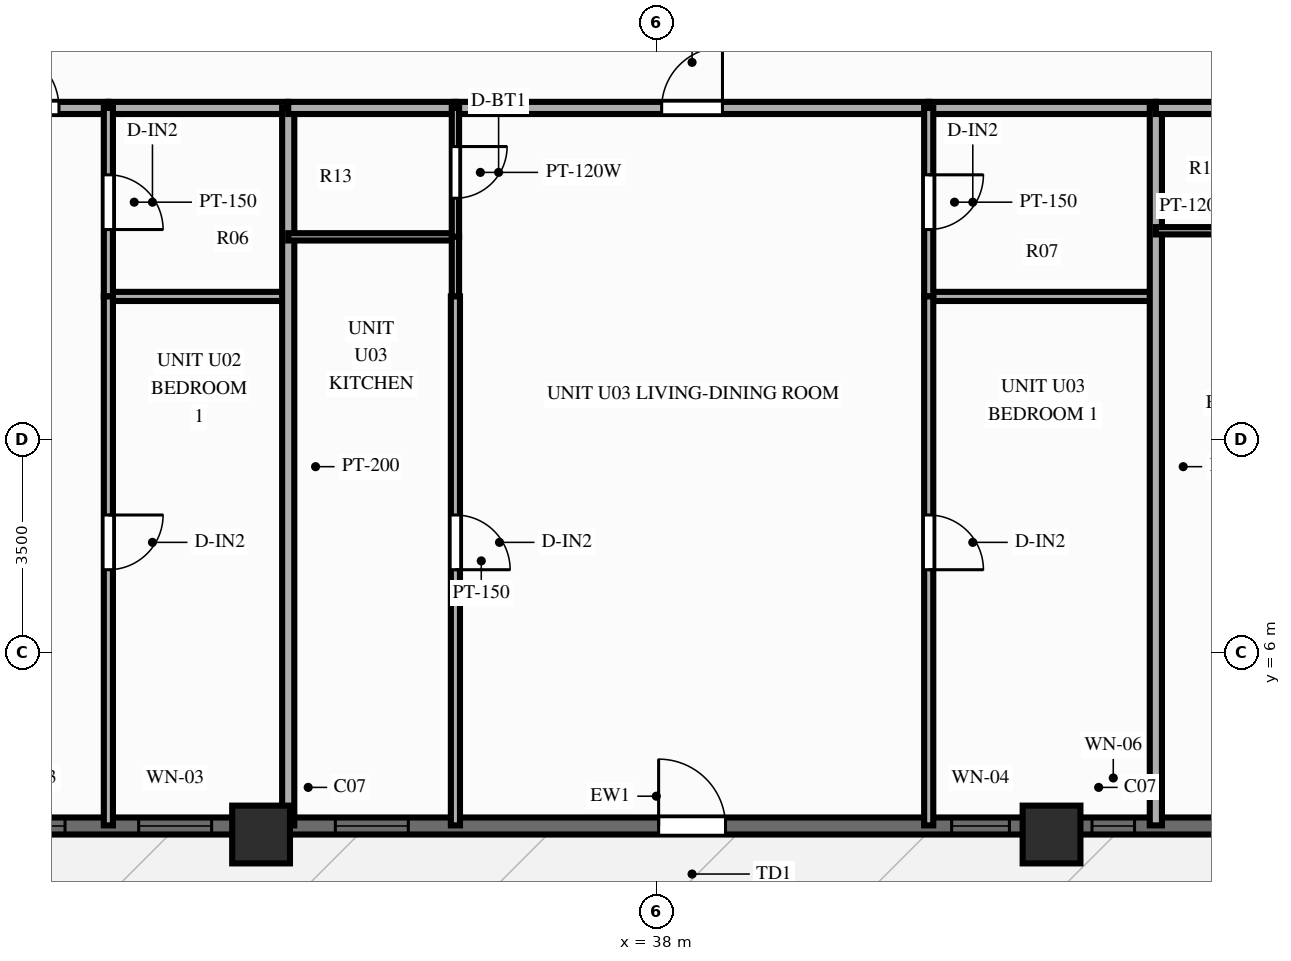
"""IFC4 building model, lengths in metres.
Left out: names, types, materials, properties, quantities, classifications, styles, units other than length and angle.
Written with IfcOpenShell. Run it as: python <this file> out.ifc"""

import sys

from ifc_helpers import new_model, si_unit, direction, frame, frame_2d, origin, origin_2d, place, context, subcontext, project, spatial, rectangle, extrude, source, transform, mapped, element, fill, save


model = new_model("IFC4")
c1 = context("Model", 3, precision=1e-05, world=origin(), true_north=direction((0.0, 1.0)))
c2 = subcontext(c1, "Body", "Model", "MODEL_VIEW")
j1 = project(units=[si_unit("LENGTHUNIT", "METRE"), si_unit("PLANEANGLEUNIT", "RADIAN")], contexts=[c1])
p1 = place(None, origin())
s1 = spatial("IfcSite", under=j1, at=p1, CompositionType="ELEMENT")
p2 = place(p1, origin())
s2 = spatial("IfcBuilding", under=s1, at=p2, CompositionType="ELEMENT")
p3 = place(p2, frame((0.0, 0.0, 83.85)))
s3 = spatial("IfcBuildingStorey", under=s2, at=p3, CompositionType="ELEMENT", Elevation=83.85)
m1 = source(origin(), c2, "Body", "SweptSolid", [
    extrude(rectangle(XDim=0.95, YDim=0.95, at=origin_2d()), origin(), (0.0, 0.0, 1.0), 3.0),
])
for number, where, z_axis, x_axis in (
    (1, (31.5, 3.0, 0.0), (0.0, 0.0, 1.0), (1.0, 0.0, 0.0)),
    (2, (44.5, 3.0, 0.0), (0.0, 0.0, 1.0), (1.0, 0.0, 0.0)),
):
    element("IfcColumn", number, at=place(p3, frame(where, z_axis=z_axis, x_axis=x_axis)), inside=s3, PredefinedType="COLUMN", context=c2, shape_type="MappedRepresentation", body=[
        mapped(m1, transform((0.0, 0.0, 0.0), scale=1.0)),
    ])
p4 = place(p3, frame((16.2, 3.14, 0.0), z_axis=(0.0, 0.0, 1.0), x_axis=(1.0, 0.0, 0.0)))
e3 = element("IfcWall", 3, at=p4, inside=s3, PredefinedType="SOLIDWALL", context=c2, shape_type="SweptSolid", body=[
    extrude(rectangle(XDim=43.6, YDim=0.28, at=frame_2d((21.8, 0.0))), origin(), (0.0, 0.0, 1.0), 2.28),
])
p5 = place(p4, frame((0.748, 0.0, 0.25)))
e4 = element("IfcOpeningElement", 4, at=p5, cuts=e3, PredefinedType="OPENING", context=c2, shape_type="SweptSolid", body=[
    extrude(rectangle(XDim=1.2, YDim=1.5, at=frame_2d((0.6, 0.75))), frame((0.0, 0.152, 0.0), z_axis=(0.0, -1.0, 0.0), x_axis=(1.0, 0.0, 0.0)), (0.0, 0.0, 1.0), 0.304),
])
p6 = place(p4, frame((3.093, 0.0, 0.25)))
e5 = element("IfcOpeningElement", 5, at=p6, cuts=e3, PredefinedType="OPENING", context=c2, shape_type="SweptSolid", body=[
    extrude(rectangle(XDim=1.2, YDim=1.5, at=frame_2d((0.6, 0.75))), frame((0.0, 0.152, 0.0), z_axis=(0.0, -1.0, 0.0), x_axis=(1.0, 0.0, 0.0)), (0.0, 0.0, 1.0), 0.304),
])
p7 = place(p4, frame((5.885, 0.0, 0.25)))
e6 = element("IfcOpeningElement", 6, at=p7, cuts=e3, PredefinedType="OPENING", context=c2, shape_type="SweptSolid", body=[
    extrude(rectangle(XDim=1.2, YDim=1.5, at=frame_2d((0.6, 0.75))), frame((0.0, 0.152, 0.0), z_axis=(0.0, -1.0, 0.0), x_axis=(1.0, 0.0, 0.0)), (0.0, 0.0, 1.0), 0.304),
])
p8 = place(p4, frame((8.463, 0.0, 0.25)))
e7 = element("IfcOpeningElement", 7, at=p8, cuts=e3, PredefinedType="OPENING", context=c2, shape_type="SweptSolid", body=[
    extrude(rectangle(XDim=1.2, YDim=1.5, at=frame_2d((0.6, 0.75))), frame((0.0, 0.152, 0.0), z_axis=(0.0, -1.0, 0.0), x_axis=(1.0, 0.0, 0.0)), (0.0, 0.0, 1.0), 0.304),
])
p9 = place(p4, frame((10.876, 0.0, 0.25)))
e8 = element("IfcOpeningElement", 8, at=p9, cuts=e3, PredefinedType="OPENING", context=c2, shape_type="SweptSolid", body=[
    extrude(rectangle(XDim=1.2, YDim=1.5, at=frame_2d((0.6, 0.75))), frame((0.0, 0.152, 0.0), z_axis=(0.0, -1.0, 0.0), x_axis=(1.0, 0.0, 0.0)), (0.0, 0.0, 1.0), 0.304),
])
p10 = place(p4, frame((13.287, 0.0, 0.25)))
e9 = element("IfcOpeningElement", 9, at=p10, cuts=e3, PredefinedType="OPENING", context=c2, shape_type="SweptSolid", body=[
    extrude(rectangle(XDim=1.2, YDim=1.5, at=frame_2d((0.6, 0.75))), frame((0.0, 0.152, 0.0), z_axis=(0.0, -1.0, 0.0), x_axis=(1.0, 0.0, 0.0)), (0.0, 0.0, 1.0), 0.304),
])
p11 = place(p4, frame((16.521, 0.0, 0.25)))
e10 = element("IfcOpeningElement", 10, at=p11, cuts=e3, PredefinedType="OPENING", context=c2, shape_type="SweptSolid", body=[
    extrude(rectangle(XDim=1.2, YDim=1.5, at=frame_2d((0.6, 0.75))), frame((0.0, 0.152, 0.0), z_axis=(0.0, -1.0, 0.0), x_axis=(1.0, 0.0, 0.0)), (0.0, 0.0, 1.0), 0.304),
])
p12 = place(p4, frame((22.938, 0.0, 0.0), z_axis=(0.0, 0.0, 1.0), x_axis=(-1.0, 0.0, 0.0)))
e11 = element("IfcOpeningElement", 11, at=p12, cuts=e3, PredefinedType="OPENING", context=c2, shape_type="SweptSolid", body=[
    extrude(rectangle(XDim=1.1, YDim=2.15, at=frame_2d((0.55, 1.075))), frame((0.0, 0.152, 0.0), z_axis=(0.0, -1.0, 0.0), x_axis=(1.0, 0.0, 0.0)), (0.0, 0.0, 1.0), 0.304),
])
p13 = place(p4, frame((26.657, 0.0, 0.25)))
e12 = element("IfcOpeningElement", 12, at=p13, cuts=e3, PredefinedType="OPENING", context=c2, shape_type="SweptSolid", body=[
    extrude(rectangle(XDim=0.95, YDim=1.5, at=frame_2d((0.475, 0.75))), frame((0.0, 0.152, 0.0), z_axis=(0.0, -1.0, 0.0), x_axis=(1.0, 0.0, 0.0)), (0.0, 0.0, 1.0), 0.304),
])
p14 = place(p4, frame((28.965, 0.0, 0.25)))
e13 = element("IfcOpeningElement", 13, at=p14, cuts=e3, PredefinedType="OPENING", context=c2, shape_type="SweptSolid", body=[
    extrude(rectangle(XDim=0.7, YDim=1.5, at=frame_2d((0.35, 0.75))), frame((0.0, 0.152, 0.0), z_axis=(0.0, -1.0, 0.0), x_axis=(1.0, 0.0, 0.0)), (0.0, 0.0, 1.0), 0.304),
])
p15 = place(p4, frame((31.158, 0.0, 0.25)))
e14 = element("IfcOpeningElement", 14, at=p15, cuts=e3, PredefinedType="OPENING", context=c2, shape_type="SweptSolid", body=[
    extrude(rectangle(XDim=1.2, YDim=1.5, at=frame_2d((0.6, 0.75))), frame((0.0, 0.152, 0.0), z_axis=(0.0, -1.0, 0.0), x_axis=(1.0, 0.0, 0.0)), (0.0, 0.0, 1.0), 0.304),
])
p16 = place(p4, frame((35.992, 0.0, 0.25)))
e15 = element("IfcOpeningElement", 15, at=p16, cuts=e3, PredefinedType="OPENING", context=c2, shape_type="SweptSolid", body=[
    extrude(rectangle(XDim=1.2, YDim=1.5, at=frame_2d((0.6, 0.75))), frame((0.0, 0.152, 0.0), z_axis=(0.0, -1.0, 0.0), x_axis=(1.0, 0.0, 0.0)), (0.0, 0.0, 1.0), 0.304),
])
p17 = place(p4, frame((40.885, 0.0, 0.25)))
e16 = element("IfcOpeningElement", 16, at=p17, cuts=e3, PredefinedType="OPENING", context=c2, shape_type="SweptSolid", body=[
    extrude(rectangle(XDim=1.2, YDim=1.5, at=frame_2d((0.6, 0.75))), frame((0.0, 0.152, 0.0), z_axis=(0.0, -1.0, 0.0), x_axis=(1.0, 0.0, 0.0)), (0.0, 0.0, 1.0), 0.304),
])
p18 = place(p3, frame((26.363, 14.95, 0.0), z_axis=(0.0, 0.0, 1.0), x_axis=(1.0, 0.0, 0.0)))
e17 = element("IfcWall", 17, at=p18, inside=s3, PredefinedType="PARTITIONING", context=c2, shape_type="SweptSolid", body=[
    extrude(rectangle(XDim=2.625, YDim=0.2, at=frame_2d((1.313, 0.0))), origin(), (0.0, 0.0, 1.0), 2.79),
])
p19 = place(p18, frame((0.813, 0.0, 0.0)))
e18 = element("IfcOpeningElement", 18, at=p19, cuts=e17, PredefinedType="OPENING", context=c2, shape_type="SweptSolid", body=[
    extrude(rectangle(XDim=1.0, YDim=2.15, at=frame_2d((0.5, 1.075))), frame((0.0, 0.112, 0.0), z_axis=(0.0, -1.0, 0.0), x_axis=(1.0, 0.0, 0.0)), (0.0, 0.0, 1.0), 0.224),
])
p20 = place(p3, frame((28.989, 14.95, 0.0), z_axis=(0.0, 0.0, 1.0), x_axis=(1.0, 0.0, 0.0)))
e19 = element("IfcWall", 19, at=p20, inside=s3, PredefinedType="PARTITIONING", context=c2, shape_type="SweptSolid", body=[
    extrude(rectangle(XDim=2.958, YDim=0.2, at=frame_2d((1.479, 0.0))), origin(), (0.0, 0.0, 1.0), 2.79),
])
p21 = place(p3, frame((28.989, 11.85, 0.0), z_axis=(0.0, 0.0, 1.0), x_axis=(1.0, 0.0, 0.0)))
e20 = element("IfcWall", 20, at=p21, inside=s3, PredefinedType="PARTITIONING", context=c2, shape_type="SweptSolid", body=[
    extrude(rectangle(XDim=2.958, YDim=0.15, at=frame_2d((1.479, 0.0))), origin(), (0.0, 0.0, 1.0), 2.79),
])
p22 = place(p3, frame((28.989, 14.95, 0.0), z_axis=(0.0, 0.0, 1.0), x_axis=(0.0, -1.0, 0.0)))
e21 = element("IfcWall", 21, at=p22, inside=s3, PredefinedType="PARTITIONING", context=c2, shape_type="SweptSolid", body=[
    extrude(rectangle(XDim=3.1, YDim=0.15, at=frame_2d((1.55, 0.0))), origin(), (0.0, 0.0, 1.0), 2.79),
])
p23 = place(p22, frame((1.1, 0.0, 0.0)))
e22 = element("IfcOpeningElement", 22, at=p23, cuts=e21, PredefinedType="OPENING", context=c2, shape_type="SweptSolid", body=[
    extrude(rectangle(XDim=0.9, YDim=2.1, at=frame_2d((0.45, 1.05))), frame((0.0, 0.087, 0.0), z_axis=(0.0, -1.0, 0.0), x_axis=(1.0, 0.0, 0.0)), (0.0, 0.0, 1.0), 0.174),
])
p24 = place(p3, frame((28.989, 11.85, 0.0), z_axis=(0.0, 0.0, 1.0), x_axis=(0.0, -1.0, 0.0)))
e23 = element("IfcWall", 23, at=p24, inside=s3, PredefinedType="PARTITIONING", context=c2, shape_type="SweptSolid", body=[
    extrude(rectangle(XDim=8.7, YDim=0.15, at=frame_2d((4.35, 0.0))), origin(), (0.0, 0.0, 1.0), 2.79),
])
p25 = place(p24, frame((3.595, 0.0, 0.0)))
e24 = element("IfcOpeningElement", 24, at=p25, cuts=e23, PredefinedType="OPENING", context=c2, shape_type="SweptSolid", body=[
    extrude(rectangle(XDim=0.9, YDim=2.1, at=frame_2d((0.45, 1.05))), frame((0.0, 0.087, 0.0), z_axis=(0.0, -1.0, 0.0), x_axis=(1.0, 0.0, 0.0)), (0.0, 0.0, 1.0), 0.174),
])
p26 = place(p3, frame((31.946, 14.95, 0.0), z_axis=(0.0, 0.0, 1.0), x_axis=(0.0, -1.0, 0.0)))
e25 = element("IfcWall", 25, at=p26, inside=s3, PredefinedType="PARTITIONING", context=c2, shape_type="SweptSolid", body=[
    extrude(rectangle(XDim=11.8, YDim=0.2, at=frame_2d((5.9, 0.0))), origin(), (0.0, 0.0, 1.0), 2.79),
])
p27 = place(p3, frame((31.946, 14.95, 0.0), z_axis=(0.0, 0.0, 1.0), x_axis=(1.0, 0.0, 0.0)))
e26 = element("IfcWall", 26, at=p27, inside=s3, PredefinedType="PARTITIONING", context=c2, shape_type="SweptSolid", body=[
    extrude(rectangle(XDim=2.75, YDim=0.2, at=frame_2d((1.375, 0.0))), origin(), (0.0, 0.0, 1.0), 2.79),
])
p28 = place(p3, frame((34.696, 14.95, 0.0), z_axis=(0.0, 0.0, 1.0), x_axis=(1.0, 0.0, 0.0)))
e27 = element("IfcWall", 27, at=p28, inside=s3, PredefinedType="PARTITIONING", context=c2, shape_type="SweptSolid", body=[
    extrude(rectangle(XDim=7.784, YDim=0.2, at=frame_2d((3.892, 0.0))), origin(), (0.0, 0.0, 1.0), 2.79),
])
p29 = place(p28, frame((3.392, 0.0, 0.0)))
e28 = element("IfcOpeningElement", 28, at=p29, cuts=e27, PredefinedType="OPENING", context=c2, shape_type="SweptSolid", body=[
    extrude(rectangle(XDim=1.0, YDim=2.15, at=frame_2d((0.5, 1.075))), frame((0.0, 0.112, 0.0), z_axis=(0.0, -1.0, 0.0), x_axis=(1.0, 0.0, 0.0)), (0.0, 0.0, 1.0), 0.224),
])
p30 = place(p3, frame((42.48, 14.95, 0.0), z_axis=(0.0, 0.0, 1.0), x_axis=(1.0, 0.0, 0.0)))
e29 = element("IfcWall", 29, at=p30, inside=s3, PredefinedType="PARTITIONING", context=c2, shape_type="SweptSolid", body=[
    extrude(rectangle(XDim=3.736, YDim=0.2, at=frame_2d((1.868, 0.0))), origin(), (0.0, 0.0, 1.0), 2.79),
])
p31 = place(p3, frame((31.946, 12.83, 0.0), z_axis=(0.0, 0.0, 1.0), x_axis=(1.0, 0.0, 0.0)))
e30 = element("IfcWall", 30, at=p31, inside=s3, PredefinedType="PARTITIONING", context=c2, shape_type="SweptSolid", body=[
    extrude(rectangle(XDim=2.75, YDim=0.12, at=frame_2d((1.375, 0.0))), origin(), (0.0, 0.0, 1.0), 2.79),
])
p32 = place(p3, frame((42.48, 11.85, 0.0), z_axis=(0.0, 0.0, 1.0), x_axis=(1.0, 0.0, 0.0)))
e31 = element("IfcWall", 31, at=p32, inside=s3, PredefinedType="PARTITIONING", context=c2, shape_type="SweptSolid", body=[
    extrude(rectangle(XDim=3.736, YDim=0.15, at=frame_2d((1.868, 0.0))), origin(), (0.0, 0.0, 1.0), 2.79),
])
p33 = place(p3, frame((34.696, 14.95, 0.0), z_axis=(0.0, 0.0, 1.0), x_axis=(0.0, -1.0, 0.0)))
e32 = element("IfcWall", 32, at=p33, inside=s3, PredefinedType="PARTITIONING", context=c2, shape_type="SweptSolid", body=[
    extrude(rectangle(XDim=2.12, YDim=0.12, at=frame_2d((1.06, 0.0))), origin(), (0.0, 0.0, 1.0), 2.79),
])
p34 = place(p33, frame((0.635, 0.0, 0.0)))
e33 = element("IfcOpeningElement", 33, at=p34, cuts=e32, PredefinedType="OPENING", context=c2, shape_type="SweptSolid", body=[
    extrude(rectangle(XDim=0.85, YDim=2.05, at=frame_2d((0.425, 1.025))), frame((0.0, 0.072, 0.0), z_axis=(0.0, -1.0, 0.0), x_axis=(1.0, 0.0, 0.0)), (0.0, 0.0, 1.0), 0.144),
])
p35 = place(p3, frame((34.696, 12.83, 0.0), z_axis=(0.0, 0.0, 1.0), x_axis=(0.0, -1.0, 0.0)))
e34 = element("IfcWall", 34, at=p35, inside=s3, PredefinedType="PARTITIONING", context=c2, shape_type="SweptSolid", body=[
    extrude(rectangle(XDim=0.98, YDim=0.12, at=frame_2d((0.49, 0.0))), origin(), (0.0, 0.0, 1.0), 2.79),
])
p36 = place(p3, frame((34.696, 11.85, 0.0), z_axis=(0.0, 0.0, 1.0), x_axis=(0.0, -1.0, 0.0)))
e35 = element("IfcWall", 35, at=p36, inside=s3, PredefinedType="PARTITIONING", context=c2, shape_type="SweptSolid", body=[
    extrude(rectangle(XDim=8.7, YDim=0.15, at=frame_2d((4.35, 0.0))), origin(), (0.0, 0.0, 1.0), 2.79),
])
p37 = place(p36, frame((3.595, 0.0, 0.0)))
e36 = element("IfcOpeningElement", 36, at=p37, cuts=e35, PredefinedType="OPENING", context=c2, shape_type="SweptSolid", body=[
    extrude(rectangle(XDim=0.9, YDim=2.1, at=frame_2d((0.45, 1.05))), frame((0.0, 0.087, 0.0), z_axis=(0.0, -1.0, 0.0), x_axis=(1.0, 0.0, 0.0)), (0.0, 0.0, 1.0), 0.174),
])
p38 = place(p3, frame((42.48, 14.95, 0.0), z_axis=(0.0, 0.0, 1.0), x_axis=(0.0, -1.0, 0.0)))
e37 = element("IfcWall", 37, at=p38, inside=s3, PredefinedType="PARTITIONING", context=c2, shape_type="SweptSolid", body=[
    extrude(rectangle(XDim=3.1, YDim=0.15, at=frame_2d((1.55, 0.0))), origin(), (0.0, 0.0, 1.0), 2.79),
])
p39 = place(p38, frame((1.1, 0.0, 0.0)))
e38 = element("IfcOpeningElement", 38, at=p39, cuts=e37, PredefinedType="OPENING", context=c2, shape_type="SweptSolid", body=[
    extrude(rectangle(XDim=0.9, YDim=2.1, at=frame_2d((0.45, 1.05))), frame((0.0, 0.087, 0.0), z_axis=(0.0, -1.0, 0.0), x_axis=(1.0, 0.0, 0.0)), (0.0, 0.0, 1.0), 0.174),
])
p40 = place(p3, frame((42.48, 11.85, 0.0), z_axis=(0.0, 0.0, 1.0), x_axis=(0.0, -1.0, 0.0)))
e39 = element("IfcWall", 39, at=p40, inside=s3, PredefinedType="PARTITIONING", context=c2, shape_type="SweptSolid", body=[
    extrude(rectangle(XDim=8.7, YDim=0.15, at=frame_2d((4.35, 0.0))), origin(), (0.0, 0.0, 1.0), 2.79),
])
p41 = place(p40, frame((3.595, 0.0, 0.0)))
e40 = element("IfcOpeningElement", 40, at=p41, cuts=e39, PredefinedType="OPENING", context=c2, shape_type="SweptSolid", body=[
    extrude(rectangle(XDim=0.9, YDim=2.1, at=frame_2d((0.45, 1.05))), frame((0.0, 0.087, 0.0), z_axis=(0.0, -1.0, 0.0), x_axis=(1.0, 0.0, 0.0)), (0.0, 0.0, 1.0), 0.174),
])
p42 = place(p3, frame((46.216, 14.95, 0.0), z_axis=(0.0, 0.0, 1.0), x_axis=(0.0, -1.0, 0.0)))
e41 = element("IfcWall", 41, at=p42, inside=s3, PredefinedType="PARTITIONING", context=c2, shape_type="SweptSolid", body=[
    extrude(rectangle(XDim=11.8, YDim=0.2, at=frame_2d((5.9, 0.0))), origin(), (0.0, 0.0, 1.0), 2.79),
])
p43 = place(p3, frame((46.216, 14.95, 0.0), z_axis=(0.0, 0.0, 1.0), x_axis=(1.0, 0.0, 0.0)))
e42 = element("IfcWall", 42, at=p43, inside=s3, PredefinedType="PARTITIONING", context=c2, shape_type="SweptSolid", body=[
    extrude(rectangle(XDim=3.485, YDim=0.2, at=frame_2d((1.743, 0.0))), origin(), (0.0, 0.0, 1.0), 2.79),
])
p44 = place(p3, frame((46.216, 12.93, 0.0), z_axis=(0.0, 0.0, 1.0), x_axis=(1.0, 0.0, 0.0)))
e43 = element("IfcWall", 43, at=p44, inside=s3, PredefinedType="PARTITIONING", context=c2, shape_type="SweptSolid", body=[
    extrude(rectangle(XDim=3.485, YDim=0.12, at=frame_2d((1.743, 0.0))), origin(), (0.0, 0.0, 1.0), 2.79),
])
m2 = source(origin(), c2, "Body", "SweptSolid", [
    extrude(rectangle(XDim=1.2, YDim=1.5, at=frame_2d((0.6, 0.75))), frame((0.0, 0.03, 0.0), z_axis=(0.0, -1.0, 0.0), x_axis=(1.0, 0.0, 0.0)), (0.0, 0.0, 1.0), 0.06),
])
p45 = place(p9, origin())
e44 = element("IfcWindow", 44, at=p45, inside=s3, PartitioningType="SINGLE_PANEL", PredefinedType="WINDOW", context=c2, shape_type="MappedRepresentation", body=[
    mapped(m2, transform((0.0, 0.0, 0.0), scale=1.0)),
])
fill(e8, e44)
p46 = place(p10, origin())
e45 = element("IfcWindow", 45, at=p46, inside=s3, PartitioningType="SINGLE_PANEL", PredefinedType="WINDOW", context=c2, shape_type="MappedRepresentation", body=[
    mapped(m2, transform((0.0, 0.0, 0.0), scale=1.0)),
])
fill(e9, e45)
p47 = place(p11, origin())
e46 = element("IfcWindow", 46, at=p47, inside=s3, PartitioningType="SINGLE_PANEL", PredefinedType="WINDOW", context=c2, shape_type="MappedRepresentation", body=[
    mapped(m2, transform((0.0, 0.0, 0.0), scale=1.0)),
])
fill(e10, e46)
m3 = source(origin(), c2, "Body", "SweptSolid", [
    extrude(rectangle(XDim=1.1, YDim=2.15, at=frame_2d((0.55, 1.075))), frame((0.0, 0.025, 0.0), z_axis=(0.0, -1.0, 0.0), x_axis=(1.0, 0.0, 0.0)), (0.0, 0.0, 1.0), 0.05),
])
p48 = place(p12, origin())
e47 = element("IfcDoor", 47, at=p48, inside=s3, OperationType="SINGLE_SWING_RIGHT", PredefinedType="DOOR", context=c2, shape_type="MappedRepresentation", body=[
    mapped(m3, transform((0.0, 0.0, 0.0), scale=1.0)),
])
fill(e11, e47)
m4 = source(origin(), c2, "Body", "SweptSolid", [
    extrude(rectangle(XDim=0.95, YDim=1.5, at=frame_2d((0.475, 0.75))), frame((0.0, 0.03, 0.0), z_axis=(0.0, -1.0, 0.0), x_axis=(1.0, 0.0, 0.0)), (0.0, 0.0, 1.0), 0.06),
])
p49 = place(p13, origin())
e48 = element("IfcWindow", 48, at=p49, inside=s3, PartitioningType="SINGLE_PANEL", PredefinedType="WINDOW", context=c2, shape_type="MappedRepresentation", body=[
    mapped(m4, transform((0.0, 0.0, 0.0), scale=1.0)),
])
fill(e12, e48)
m5 = source(origin(), c2, "Body", "SweptSolid", [
    extrude(rectangle(XDim=0.7, YDim=1.5, at=frame_2d((0.35, 0.75))), frame((0.0, 0.03, 0.0), z_axis=(0.0, -1.0, 0.0), x_axis=(1.0, 0.0, 0.0)), (0.0, 0.0, 1.0), 0.06),
])
p50 = place(p14, origin())
e49 = element("IfcWindow", 49, at=p50, inside=s3, PartitioningType="SINGLE_PANEL", PredefinedType="WINDOW", context=c2, shape_type="MappedRepresentation", body=[
    mapped(m5, transform((0.0, 0.0, 0.0), scale=1.0)),
])
fill(e13, e49)
m6 = source(origin(), c2, "Body", "SweptSolid", [
    extrude(rectangle(XDim=1.0, YDim=2.15, at=frame_2d((0.5, 1.075))), frame((0.0, 0.025, 0.0), z_axis=(0.0, -1.0, 0.0), x_axis=(1.0, 0.0, 0.0)), (0.0, 0.0, 1.0), 0.05),
])
p51 = place(p19, origin())
e50 = element("IfcDoor", 50, at=p51, inside=s3, OperationType="SINGLE_SWING_LEFT", PredefinedType="DOOR", context=c2, shape_type="MappedRepresentation", body=[
    mapped(m6, transform((0.0, 0.0, 0.0), scale=1.0)),
])
fill(e18, e50)
m7 = source(origin(), c2, "Body", "SweptSolid", [
    extrude(rectangle(XDim=0.9, YDim=2.1, at=frame_2d((0.45, 1.05))), frame((0.0, 0.025, 0.0), z_axis=(0.0, -1.0, 0.0), x_axis=(1.0, 0.0, 0.0)), (0.0, 0.0, 1.0), 0.05),
])
p52 = place(p23, origin())
e51 = element("IfcDoor", 51, at=p52, inside=s3, OperationType="SINGLE_SWING_RIGHT", PredefinedType="DOOR", context=c2, shape_type="MappedRepresentation", body=[
    mapped(m7, transform((0.0, 0.0, 0.0), scale=1.0)),
])
fill(e22, e51)
p53 = place(p25, origin())
e52 = element("IfcDoor", 52, at=p53, inside=s3, OperationType="SINGLE_SWING_LEFT", PredefinedType="DOOR", context=c2, shape_type="MappedRepresentation", body=[
    mapped(m7, transform((0.0, 0.0, 0.0), scale=1.0)),
])
fill(e24, e52)
p54 = place(p29, origin())
e53 = element("IfcDoor", 53, at=p54, inside=s3, OperationType="SINGLE_SWING_RIGHT", PredefinedType="DOOR", context=c2, shape_type="MappedRepresentation", body=[
    mapped(m6, transform((0.0, 0.0, 0.0), scale=1.0)),
])
fill(e28, e53)
m8 = source(origin(), c2, "Body", "SweptSolid", [
    extrude(rectangle(XDim=0.85, YDim=2.05, at=frame_2d((0.425, 1.025))), frame((0.0, 0.025, 0.0), z_axis=(0.0, -1.0, 0.0), x_axis=(1.0, 0.0, 0.0)), (0.0, 0.0, 1.0), 0.05),
])
p55 = place(p34, origin())
e54 = element("IfcDoor", 54, at=p55, inside=s3, OperationType="SINGLE_SWING_LEFT", PredefinedType="DOOR", context=c2, shape_type="MappedRepresentation", body=[
    mapped(m8, transform((0.0, 0.0, 0.0), scale=1.0)),
])
fill(e33, e54)
p56 = place(p37, origin())
e55 = element("IfcDoor", 55, at=p56, inside=s3, OperationType="SINGLE_SWING_RIGHT", PredefinedType="DOOR", context=c2, shape_type="MappedRepresentation", body=[
    mapped(m7, transform((0.0, 0.0, 0.0), scale=1.0)),
])
fill(e36, e55)
p57 = place(p39, origin())
e56 = element("IfcDoor", 56, at=p57, inside=s3, OperationType="SINGLE_SWING_LEFT", PredefinedType="DOOR", context=c2, shape_type="MappedRepresentation", body=[
    mapped(m7, transform((0.0, 0.0, 0.0), scale=1.0)),
])
fill(e38, e56)
p58 = place(p41, origin())
e57 = element("IfcDoor", 57, at=p58, inside=s3, OperationType="SINGLE_SWING_RIGHT", PredefinedType="DOOR", context=c2, shape_type="MappedRepresentation", body=[
    mapped(m7, transform((0.0, 0.0, 0.0), scale=1.0)),
])
fill(e40, e57)
save(model, sys.argv[1])
